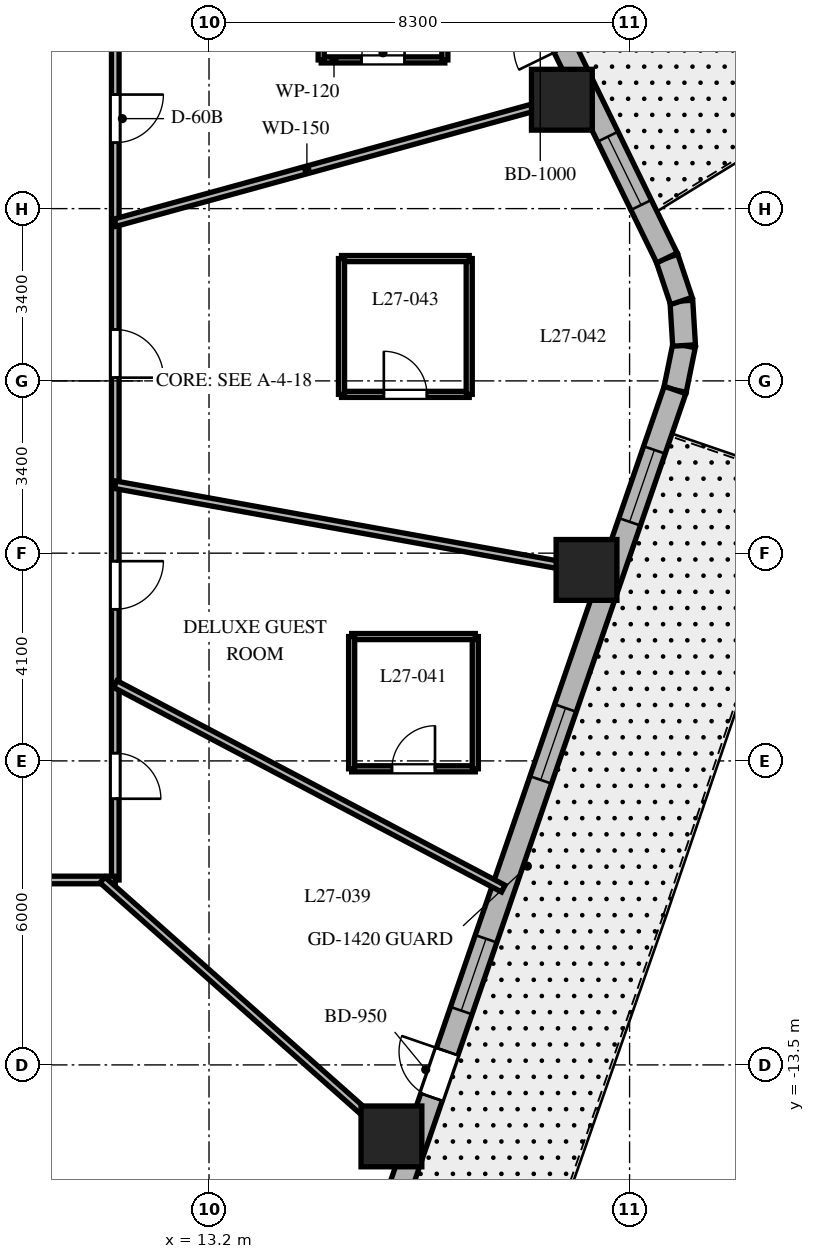
"""IFC4 building model, lengths in metres.
Left out: names, types, materials, properties, quantities, classifications, styles, units other than length and angle.
Written with IfcOpenShell. Run it as: python <this file> out.ifc"""

import sys

from ifc_helpers import new_model, si_unit, direction, frame, frame_2d, origin, origin_2d, place, context, subcontext, project, spatial, rectangle, extrude, element, fill, save


model = new_model("IFC4")
c1 = context("Model", 3, precision=1e-05, world=origin(), true_north=direction((0.0, 1.0)))
c2 = subcontext(c1, "Body", "Model", "MODEL_VIEW")
j1 = project(units=[si_unit("LENGTHUNIT", "METRE"), si_unit("PLANEANGLEUNIT", "RADIAN")], contexts=[c1])
p1 = place(None, origin())
s1 = spatial("IfcSite", under=j1, at=p1, CompositionType="ELEMENT")
p2 = place(p1, origin())
s2 = spatial("IfcBuilding", under=s1, at=p2, CompositionType="ELEMENT")
p3 = place(p2, frame((0.0, 0.0, 113.6)))
s3 = spatial("IfcBuildingStorey", under=s2, at=p3, CompositionType="ELEMENT", Elevation=113.6)
for number, where, z_axis, x_axis in (
    (1, (16.8, -14.911, 0.0), (0.0, 0.0, 1.0), (1.0, 0.0, 0.0)),
    (2, (20.65, -3.731, 0.0), (0.0, 0.0, 1.0), (1.0, 0.0, 0.0)),
    (3, (20.164, 5.549, 0.0), (0.0, 0.0, 1.0), (1.0, 0.0, 0.0)),
):
    element("IfcColumn", number, at=place(p3, frame(where, z_axis=z_axis, x_axis=x_axis)), inside=s3, PredefinedType="COLUMN", context=c2, shape_type="SweptSolid", body=[
        extrude(rectangle(XDim=1.2, YDim=1.2, at=origin_2d()), origin(), (0.0, 0.0, 1.0), 3.7),
    ])
p4 = place(p3, frame((22.397, -0.179, 0.0), z_axis=(0.0, 0.0, 1.0), x_axis=(0.199313589404, 0.979935759669, 0.0)))
e4 = element("IfcWall", 4, at=p4, inside=s3, PredefinedType="SOLIDWALL", context=c2, shape_type="SweptSolid", body=[
    extrude(rectangle(XDim=0.896, YDim=0.45, at=frame_2d((0.448, 0.0))), origin(), (0.0, 0.0, 1.0), 3.4),
])
p5 = place(p3, frame((22.575, 0.698, 0.0), z_axis=(0.0, 0.0, 1.0), x_axis=(-0.060980441946, 0.998138961117, 0.0)))
e5 = element("IfcWall", 5, at=p5, inside=s3, PredefinedType="SOLIDWALL", context=c2, shape_type="SweptSolid", body=[
    extrude(rectangle(XDim=0.881, YDim=0.45, at=frame_2d((0.44, 0.0))), origin(), (0.0, 0.0, 1.0), 3.4),
])
p6 = place(p3, frame((22.522, 1.577, 0.0), z_axis=(0.0, 0.0, 1.0), x_axis=(-0.317372694837, 0.948300887151, 0.0)))
e6 = element("IfcWall", 6, at=p6, inside=s3, PredefinedType="SOLIDWALL", context=c2, shape_type="SweptSolid", body=[
    extrude(rectangle(XDim=0.896, YDim=0.45, at=frame_2d((0.448, 0.0))), origin(), (0.0, 0.0, 1.0), 3.4),
])
p7 = place(p3, frame((15.992, -18.777, 0.0), z_axis=(0.0, 0.0, 1.0), x_axis=(0.325606988926, 0.945505202927, 0.0)))
e7 = element("IfcWall", 7, at=p7, inside=s3, PredefinedType="SOLIDWALL", context=c2, shape_type="SweptSolid", body=[
    extrude(rectangle(XDim=19.669, YDim=0.45, at=frame_2d((9.835, 0.0))), origin(), (0.0, 0.0, 1.0), 3.4),
])
p8 = place(p7, frame((4.909, 0.0, 0.0)))
e8 = element("IfcOpeningElement", 8, at=p8, cuts=e7, PredefinedType="OPENING", context=c2, shape_type="SweptSolid", body=[
    extrude(rectangle(XDim=0.95, YDim=2.15, at=frame_2d((0.475, 1.075))), frame((0.0, 0.235, 0.0), z_axis=(0.0, -1.0, 0.0), x_axis=(1.0, 0.0, 0.0)), (0.0, 0.0, 1.0), 0.47),
])
p9 = place(p7, frame((1.197, 0.0, 0.8)))
e9 = element("IfcOpeningElement", 9, at=p9, cuts=e7, PredefinedType="OPENING", context=c2, shape_type="SweptSolid", body=[
    extrude(rectangle(XDim=1.5, YDim=1.8, at=frame_2d((0.75, 0.9))), frame((0.0, 0.235, 0.0), z_axis=(0.0, -1.0, 0.0), x_axis=(1.0, 0.0, 0.0)), (0.0, 0.0, 1.0), 0.47),
])
p10 = place(p7, frame((6.714, 0.0, 0.8)))
e10 = element("IfcOpeningElement", 10, at=p10, cuts=e7, PredefinedType="OPENING", context=c2, shape_type="SweptSolid", body=[
    extrude(rectangle(XDim=1.5, YDim=1.8, at=frame_2d((0.75, 0.9))), frame((0.0, 0.235, 0.0), z_axis=(0.0, -1.0, 0.0), x_axis=(1.0, 0.0, 0.0)), (0.0, 0.0, 1.0), 0.47),
])
p11 = place(p7, frame((11.53, 0.0, 0.8)))
e11 = element("IfcOpeningElement", 11, at=p11, cuts=e7, PredefinedType="OPENING", context=c2, shape_type="SweptSolid", body=[
    extrude(rectangle(XDim=1.5, YDim=1.8, at=frame_2d((0.75, 0.9))), frame((0.0, 0.235, 0.0), z_axis=(0.0, -1.0, 0.0), x_axis=(1.0, 0.0, 0.0)), (0.0, 0.0, 1.0), 0.47),
])
p12 = place(p7, frame((16.918, 0.0, 0.8)))
e12 = element("IfcOpeningElement", 12, at=p12, cuts=e7, PredefinedType="OPENING", context=c2, shape_type="SweptSolid", body=[
    extrude(rectangle(XDim=1.5, YDim=1.8, at=frame_2d((0.75, 0.9))), frame((0.0, 0.235, 0.0), z_axis=(0.0, -1.0, 0.0), x_axis=(1.0, 0.0, 0.0)), (0.0, 0.0, 1.0), 0.47),
])
p13 = place(p3, frame((22.238, 2.427, 0.0), z_axis=(0.0, 0.0, 1.0), x_axis=(-0.438374803278, 0.898792262901, 0.0)))
e13 = element("IfcWall", 13, at=p13, inside=s3, PredefinedType="SOLIDWALL", context=c2, shape_type="SweptSolid", body=[
    extrude(rectangle(XDim=18.618, YDim=0.45, at=frame_2d((9.309, 0.0))), origin(), (0.0, 0.0, 1.0), 3.4),
])
p14 = place(p13, frame((4.62, 0.0, 0.0)))
e14 = element("IfcOpeningElement", 14, at=p14, cuts=e13, PredefinedType="OPENING", context=c2, shape_type="SweptSolid", body=[
    extrude(rectangle(XDim=1.0, YDim=2.15, at=frame_2d((0.5, 1.075))), frame((0.0, 0.235, 0.0), z_axis=(0.0, -1.0, 0.0), x_axis=(1.0, 0.0, 0.0)), (0.0, 0.0, 1.0), 0.47),
])
p15 = place(p13, frame((6.262, 0.0, 0.8)))
e15 = element("IfcOpeningElement", 15, at=p15, cuts=e13, PredefinedType="OPENING", context=c2, shape_type="SweptSolid", body=[
    extrude(rectangle(XDim=1.5, YDim=1.8, at=frame_2d((0.75, 0.9))), frame((0.0, 0.235, 0.0), z_axis=(0.0, -1.0, 0.0), x_axis=(1.0, 0.0, 0.0)), (0.0, 0.0, 1.0), 0.47),
])
p16 = place(p13, frame((11.501, 0.0, 0.8)))
e16 = element("IfcOpeningElement", 16, at=p16, cuts=e13, PredefinedType="OPENING", context=c2, shape_type="SweptSolid", body=[
    extrude(rectangle(XDim=1.5, YDim=1.8, at=frame_2d((0.75, 0.9))), frame((0.0, 0.235, 0.0), z_axis=(0.0, -1.0, 0.0), x_axis=(1.0, 0.0, 0.0)), (0.0, 0.0, 1.0), 0.47),
])
p17 = place(p13, frame((16.006, 0.0, 0.8)))
e17 = element("IfcOpeningElement", 17, at=p17, cuts=e13, PredefinedType="OPENING", context=c2, shape_type="SweptSolid", body=[
    extrude(rectangle(XDim=1.5, YDim=1.8, at=frame_2d((0.75, 0.9))), frame((0.0, 0.235, 0.0), z_axis=(0.0, -1.0, 0.0), x_axis=(1.0, 0.0, 0.0)), (0.0, 0.0, 1.0), 0.47),
])
p18 = place(p13, frame((1.163, 0.0, 0.8)))
e18 = element("IfcOpeningElement", 18, at=p18, cuts=e13, PredefinedType="OPENING", context=c2, shape_type="SweptSolid", body=[
    extrude(rectangle(XDim=1.5, YDim=1.8, at=frame_2d((0.75, 0.9))), frame((0.0, 0.235, 0.0), z_axis=(0.0, -1.0, 0.0), x_axis=(1.0, 0.0, 0.0)), (0.0, 0.0, 1.0), 0.47),
])
p19 = place(p3, frame((11.35, 9.85, 0.0), z_axis=(0.0, 0.0, 1.0), x_axis=(0.0, -1.0, 0.0)))
e19 = element("IfcWall", 19, at=p19, inside=s3, PredefinedType="PARTITIONING", context=c2, shape_type="SweptSolid", body=[
    extrude(rectangle(XDim=19.7, YDim=0.15, at=frame_2d((9.85, 0.0))), origin(), (0.0, 0.0, 1.0), 2.84),
])
p20 = place(p19, frame((4.199, 0.0, 0.0)))
e20 = element("IfcOpeningElement", 20, at=p20, cuts=e19, PredefinedType="OPENING", context=c2, shape_type="SweptSolid", body=[
    extrude(rectangle(XDim=0.95, YDim=2.03, at=frame_2d((0.475, 1.015))), frame((0.0, 0.085, 0.0), z_axis=(0.0, -1.0, 0.0), x_axis=(1.0, 0.0, 0.0)), (0.0, 0.0, 1.0), 0.17),
])
p21 = place(p19, frame((1.002, 0.0, 0.0)))
e21 = element("IfcOpeningElement", 21, at=p21, cuts=e19, PredefinedType="OPENING", context=c2, shape_type="SweptSolid", body=[
    extrude(rectangle(XDim=0.9, YDim=2.03, at=frame_2d((0.45, 1.015))), frame((0.0, 0.085, 0.0), z_axis=(0.0, -1.0, 0.0), x_axis=(1.0, 0.0, 0.0)), (0.0, 0.0, 1.0), 0.17),
])
p22 = place(p19, frame((17.197, 0.0, 0.0)))
e22 = element("IfcOpeningElement", 22, at=p22, cuts=e19, PredefinedType="OPENING", context=c2, shape_type="SweptSolid", body=[
    extrude(rectangle(XDim=0.9, YDim=2.03, at=frame_2d((0.45, 1.015))), frame((0.0, 0.085, 0.0), z_axis=(0.0, -1.0, 0.0), x_axis=(1.0, 0.0, 0.0)), (0.0, 0.0, 1.0), 0.17),
])
p23 = place(p19, frame((13.408, 0.0, 0.0)))
e23 = element("IfcOpeningElement", 23, at=p23, cuts=e19, PredefinedType="OPENING", context=c2, shape_type="SweptSolid", body=[
    extrude(rectangle(XDim=0.95, YDim=2.03, at=frame_2d((0.475, 1.015))), frame((0.0, 0.085, 0.0), z_axis=(0.0, -1.0, 0.0), x_axis=(1.0, 0.0, 0.0)), (0.0, 0.0, 1.0), 0.17),
])
p24 = place(p19, frame((8.836, 0.0, 0.0)))
e24 = element("IfcOpeningElement", 24, at=p24, cuts=e19, PredefinedType="OPENING", context=c2, shape_type="SweptSolid", body=[
    extrude(rectangle(XDim=0.95, YDim=2.03, at=frame_2d((0.475, 1.015))), frame((0.0, 0.085, 0.0), z_axis=(0.0, -1.0, 0.0), x_axis=(1.0, 0.0, 0.0)), (0.0, 0.0, 1.0), 0.17),
])
p25 = place(p3, frame((11.35, -9.85, 0.0), z_axis=(0.0, 0.0, 1.0), x_axis=(-1.0, 0.0, 0.0)))
e25 = element("IfcWall", 25, at=p25, inside=s3, PredefinedType="PARTITIONING", context=c2, shape_type="SweptSolid", body=[
    extrude(rectangle(XDim=22.7, YDim=0.15, at=frame_2d((11.35, 0.0))), origin(), (0.0, 0.0, 1.0), 2.84),
])
p26 = place(p25, frame((17.237, 0.0, 0.0)))
e26 = element("IfcOpeningElement", 26, at=p26, cuts=e25, PredefinedType="OPENING", context=c2, shape_type="SweptSolid", body=[
    extrude(rectangle(XDim=0.95, YDim=2.03, at=frame_2d((0.475, 1.015))), frame((0.0, 0.085, 0.0), z_axis=(0.0, -1.0, 0.0), x_axis=(1.0, 0.0, 0.0)), (0.0, 0.0, 1.0), 0.17),
])
p27 = place(p25, frame((12.192, 0.0, 0.0)))
e27 = element("IfcOpeningElement", 27, at=p27, cuts=e25, PredefinedType="OPENING", context=c2, shape_type="SweptSolid", body=[
    extrude(rectangle(XDim=0.95, YDim=2.03, at=frame_2d((0.475, 1.015))), frame((0.0, 0.085, 0.0), z_axis=(0.0, -1.0, 0.0), x_axis=(1.0, 0.0, 0.0)), (0.0, 0.0, 1.0), 0.17),
])
p28 = place(p25, frame((8.757, 0.0, 0.0)))
e28 = element("IfcOpeningElement", 28, at=p28, cuts=e25, PredefinedType="OPENING", context=c2, shape_type="SweptSolid", body=[
    extrude(rectangle(XDim=0.95, YDim=2.03, at=frame_2d((0.475, 1.015))), frame((0.0, 0.085, 0.0), z_axis=(0.0, -1.0, 0.0), x_axis=(1.0, 0.0, 0.0)), (0.0, 0.0, 1.0), 0.17),
])
p29 = place(p25, frame((3.399, 0.0, 0.0)))
e29 = element("IfcOpeningElement", 29, at=p29, cuts=e25, PredefinedType="OPENING", context=c2, shape_type="SweptSolid", body=[
    extrude(rectangle(XDim=0.95, YDim=2.03, at=frame_2d((0.475, 1.015))), frame((0.0, 0.085, 0.0), z_axis=(0.0, -1.0, 0.0), x_axis=(1.0, 0.0, 0.0)), (0.0, 0.0, 1.0), 0.17),
])
p30 = place(p3, frame((11.35, 3.123, 0.0), z_axis=(0.0, 0.0, 1.0), x_axis=(0.964151983214, 0.265350623261, 0.0)))
e30 = element("IfcWall", 30, at=p30, inside=s3, PredefinedType="PARTITIONING", context=c2, shape_type="SweptSolid", body=[
    extrude(rectangle(XDim=9.645, YDim=0.15, at=frame_2d((4.823, 0.0))), origin(), (0.0, 0.0, 1.0), 2.54),
])
p31 = place(p3, frame((11.098, -9.85, 0.0), z_axis=(0.0, 0.0, 1.0), x_axis=(0.747904295103, -0.663806572253, 0.0)))
e31 = element("IfcWall", 31, at=p31, inside=s3, PredefinedType="PARTITIONING", context=c2, shape_type="SweptSolid", body=[
    extrude(rectangle(XDim=8.16, YDim=0.15, at=frame_2d((4.08, 0.0))), origin(), (0.0, 0.0, 1.0), 2.54),
])
p32 = place(p3, frame((11.35, -5.983, 0.0), z_axis=(0.0, 0.0, 1.0), x_axis=(0.884597447182, -0.466355397137, 0.0)))
e32 = element("IfcWall", 32, at=p32, inside=s3, PredefinedType="PARTITIONING", context=c2, shape_type="SweptSolid", body=[
    extrude(rectangle(XDim=8.657, YDim=0.15, at=frame_2d((4.328, 0.0))), origin(), (0.0, 0.0, 1.0), 2.54),
])
p33 = place(p3, frame((11.35, -2.051, 0.0), z_axis=(0.0, 0.0, 1.0), x_axis=(0.984068313063, -0.177790762484, 0.0)))
e33 = element("IfcWall", 33, at=p33, inside=s3, PredefinedType="PARTITIONING", context=c2, shape_type="SweptSolid", body=[
    extrude(rectangle(XDim=9.951, YDim=0.15, at=frame_2d((4.976, 0.0))), origin(), (0.0, 0.0, 1.0), 2.54),
])
p34 = place(p3, frame((15.414, 6.335, 0.0), z_axis=(0.0, 0.0, 1.0), x_axis=(1.0, 0.0, 0.0)))
e34 = element("IfcWall", 34, at=p34, inside=s3, PredefinedType="PARTITIONING", context=c2, shape_type="SweptSolid", body=[
    extrude(rectangle(XDim=2.44, YDim=0.12, at=frame_2d((1.22, 0.0))), origin(), (0.0, 0.0, 1.0), 2.84),
])
p35 = place(p34, frame((0.795, 0.0, 0.0)))
e35 = element("IfcOpeningElement", 35, at=p35, cuts=e34, PredefinedType="OPENING", context=c2, shape_type="SweptSolid", body=[
    extrude(rectangle(XDim=0.85, YDim=2.03, at=frame_2d((0.425, 1.015))), frame((0.0, 0.07, 0.0), z_axis=(0.0, -1.0, 0.0), x_axis=(1.0, 0.0, 0.0)), (0.0, 0.0, 1.0), 0.14),
])
p36 = place(p3, frame((17.854, 6.335, 0.0), z_axis=(0.0, 0.0, 1.0), x_axis=(0.0, 1.0, 0.0)))
e36 = element("IfcWall", 36, at=p36, inside=s3, PredefinedType="PARTITIONING", context=c2, shape_type="SweptSolid", body=[
    extrude(rectangle(XDim=2.61, YDim=0.12, at=frame_2d((1.305, 0.0))), origin(), (0.0, 0.0, 1.0), 3.4),
])
p37 = place(p3, frame((15.414, 8.945, 0.0), z_axis=(0.0, 0.0, 1.0), x_axis=(0.0, -1.0, 0.0)))
e37 = element("IfcWall", 37, at=p37, inside=s3, PredefinedType="PARTITIONING", context=c2, shape_type="SweptSolid", body=[
    extrude(rectangle(XDim=2.61, YDim=0.12, at=frame_2d((1.305, 0.0))), origin(), (0.0, 0.0, 1.0), 2.84),
])
p38 = place(p3, frame((16.015, -7.656, 0.0), z_axis=(0.0, 0.0, 1.0), x_axis=(1.0, 0.0, 0.0)))
e38 = element("IfcWall", 38, at=p38, inside=s3, PredefinedType="PARTITIONING", context=c2, shape_type="SweptSolid", body=[
    extrude(rectangle(XDim=2.44, YDim=0.12, at=frame_2d((1.22, 0.0))), origin(), (0.0, 0.0, 1.0), 3.4),
])
p39 = place(p38, frame((0.795, 0.0, 0.0)))
e39 = element("IfcOpeningElement", 39, at=p39, cuts=e38, PredefinedType="OPENING", context=c2, shape_type="SweptSolid", body=[
    extrude(rectangle(XDim=0.85, YDim=2.03, at=frame_2d((0.425, 1.015))), frame((0.0, 0.07, 0.0), z_axis=(0.0, -1.0, 0.0), x_axis=(1.0, 0.0, 0.0)), (0.0, 0.0, 1.0), 0.14),
])
p40 = place(p3, frame((18.455, -7.656, 0.0), z_axis=(0.0, 0.0, 1.0), x_axis=(0.0, 1.0, 0.0)))
e40 = element("IfcWall", 40, at=p40, inside=s3, PredefinedType="PARTITIONING", context=c2, shape_type="SweptSolid", body=[
    extrude(rectangle(XDim=2.61, YDim=0.12, at=frame_2d((1.305, 0.0))), origin(), (0.0, 0.0, 1.0), 3.4),
])
p41 = place(p3, frame((18.455, -5.046, 0.0), z_axis=(0.0, 0.0, 1.0), x_axis=(-1.0, 0.0, 0.0)))
e41 = element("IfcWall", 41, at=p41, inside=s3, PredefinedType="PARTITIONING", context=c2, shape_type="SweptSolid", body=[
    extrude(rectangle(XDim=2.44, YDim=0.12, at=frame_2d((1.22, 0.0))), origin(), (0.0, 0.0, 1.0), 2.84),
])
p42 = place(p3, frame((16.015, -5.046, 0.0), z_axis=(0.0, 0.0, 1.0), x_axis=(0.0, -1.0, 0.0)))
e42 = element("IfcWall", 42, at=p42, inside=s3, PredefinedType="PARTITIONING", context=c2, shape_type="SweptSolid", body=[
    extrude(rectangle(XDim=2.61, YDim=0.12, at=frame_2d((1.305, 0.0))), origin(), (0.0, 0.0, 1.0), 2.84),
])
p43 = place(p3, frame((15.815, -0.266, 0.0), z_axis=(0.0, 0.0, 1.0), x_axis=(1.0, 0.0, 0.0)))
e43 = element("IfcWall", 43, at=p43, inside=s3, PredefinedType="PARTITIONING", context=c2, shape_type="SweptSolid", body=[
    extrude(rectangle(XDim=2.52, YDim=0.12, at=frame_2d((1.26, 0.0))), origin(), (0.0, 0.0, 1.0), 2.84),
])
p44 = place(p43, frame((0.835, 0.0, 0.0)))
e44 = element("IfcOpeningElement", 44, at=p44, cuts=e43, PredefinedType="OPENING", context=c2, shape_type="SweptSolid", body=[
    extrude(rectangle(XDim=0.85, YDim=2.03, at=frame_2d((0.425, 1.015))), frame((0.0, 0.07, 0.0), z_axis=(0.0, -1.0, 0.0), x_axis=(1.0, 0.0, 0.0)), (0.0, 0.0, 1.0), 0.14),
])
p45 = place(p3, frame((18.335, -0.266, 0.0), z_axis=(0.0, 0.0, 1.0), x_axis=(0.0, 1.0, 0.0)))
e45 = element("IfcWall", 45, at=p45, inside=s3, PredefinedType="PARTITIONING", context=c2, shape_type="SweptSolid", body=[
    extrude(rectangle(XDim=2.68, YDim=0.12, at=frame_2d((1.34, 0.0))), origin(), (0.0, 0.0, 1.0), 3.4),
])
p46 = place(p3, frame((18.335, 2.414, 0.0), z_axis=(0.0, 0.0, 1.0), x_axis=(-1.0, 0.0, 0.0)))
e46 = element("IfcWall", 46, at=p46, inside=s3, PredefinedType="PARTITIONING", context=c2, shape_type="SweptSolid", body=[
    extrude(rectangle(XDim=2.52, YDim=0.12, at=frame_2d((1.26, 0.0))), origin(), (0.0, 0.0, 1.0), 2.84),
])
p47 = place(p3, frame((15.815, 2.414, 0.0), z_axis=(0.0, 0.0, 1.0), x_axis=(0.0, -1.0, 0.0)))
e47 = element("IfcWall", 47, at=p47, inside=s3, PredefinedType="PARTITIONING", context=c2, shape_type="SweptSolid", body=[
    extrude(rectangle(XDim=2.68, YDim=0.12, at=frame_2d((1.34, 0.0))), origin(), (0.0, 0.0, 1.0), 3.4),
])
p48 = place(p8, origin())
e48 = element("IfcDoor", 48, at=p48, inside=s3, OperationType="SINGLE_SWING_RIGHT", PredefinedType="DOOR", context=c2, shape_type="SweptSolid", body=[
    extrude(rectangle(XDim=0.95, YDim=2.15, at=frame_2d((0.475, 1.075))), frame((0.0, 0.025, 0.0), z_axis=(0.0, -1.0, 0.0), x_axis=(1.0, 0.0, 0.0)), (0.0, 0.0, 1.0), 0.05),
])
fill(e8, e48)
p49 = place(p10, origin())
e49 = element("IfcWindow", 49, at=p49, inside=s3, PartitioningType="SINGLE_PANEL", PredefinedType="WINDOW", context=c2, shape_type="SweptSolid", body=[
    extrude(rectangle(XDim=1.5, YDim=1.8, at=frame_2d((0.75, 0.9))), frame((0.0, 0.03, 0.0), z_axis=(0.0, -1.0, 0.0), x_axis=(1.0, 0.0, 0.0)), (0.0, 0.0, 1.0), 0.06),
])
fill(e10, e49)
p50 = place(p11, origin())
e50 = element("IfcWindow", 50, at=p50, inside=s3, PartitioningType="SINGLE_PANEL", PredefinedType="WINDOW", context=c2, shape_type="SweptSolid", body=[
    extrude(rectangle(XDim=1.5, YDim=1.8, at=frame_2d((0.75, 0.9))), frame((0.0, 0.03, 0.0), z_axis=(0.0, -1.0, 0.0), x_axis=(1.0, 0.0, 0.0)), (0.0, 0.0, 1.0), 0.06),
])
fill(e11, e50)
p51 = place(p12, origin())
e51 = element("IfcWindow", 51, at=p51, inside=s3, PartitioningType="SINGLE_PANEL", PredefinedType="WINDOW", context=c2, shape_type="SweptSolid", body=[
    extrude(rectangle(XDim=1.5, YDim=1.8, at=frame_2d((0.75, 0.9))), frame((0.0, 0.03, 0.0), z_axis=(0.0, -1.0, 0.0), x_axis=(1.0, 0.0, 0.0)), (0.0, 0.0, 1.0), 0.06),
])
fill(e12, e51)
p52 = place(p18, origin())
e52 = element("IfcWindow", 52, at=p52, inside=s3, PartitioningType="SINGLE_PANEL", PredefinedType="WINDOW", context=c2, shape_type="SweptSolid", body=[
    extrude(rectangle(XDim=1.5, YDim=1.8, at=frame_2d((0.75, 0.9))), frame((0.0, 0.03, 0.0), z_axis=(0.0, -1.0, 0.0), x_axis=(1.0, 0.0, 0.0)), (0.0, 0.0, 1.0), 0.06),
])
fill(e18, e52)
p53 = place(p20, origin())
e53 = element("IfcDoor", 53, at=p53, inside=s3, OperationType="SINGLE_SWING_LEFT", PredefinedType="DOOR", context=c2, shape_type="SweptSolid", body=[
    extrude(rectangle(XDim=0.95, YDim=2.03, at=frame_2d((0.475, 1.015))), frame((0.0, 0.025, 0.0), z_axis=(0.0, -1.0, 0.0), x_axis=(1.0, 0.0, 0.0)), (0.0, 0.0, 1.0), 0.05),
])
fill(e20, e53)
p54 = place(p35, origin())
e54 = element("IfcDoor", 54, at=p54, inside=s3, OperationType="SINGLE_SWING_RIGHT", PredefinedType="DOOR", context=c2, shape_type="SweptSolid", body=[
    extrude(rectangle(XDim=0.85, YDim=2.03, at=frame_2d((0.425, 1.015))), frame((0.0, 0.025, 0.0), z_axis=(0.0, -1.0, 0.0), x_axis=(1.0, 0.0, 0.0)), (0.0, 0.0, 1.0), 0.05),
])
fill(e35, e54)
p55 = place(p22, origin())
e55 = element("IfcDoor", 55, at=p55, inside=s3, OperationType="SINGLE_SWING_RIGHT", PredefinedType="DOOR", context=c2, shape_type="SweptSolid", body=[
    extrude(rectangle(XDim=0.9, YDim=2.03, at=frame_2d((0.45, 1.015))), frame((0.0, 0.025, 0.0), z_axis=(0.0, -1.0, 0.0), x_axis=(1.0, 0.0, 0.0)), (0.0, 0.0, 1.0), 0.05),
])
fill(e22, e55)
p56 = place(p23, origin())
e56 = element("IfcDoor", 56, at=p56, inside=s3, OperationType="SINGLE_SWING_LEFT", PredefinedType="DOOR", context=c2, shape_type="SweptSolid", body=[
    extrude(rectangle(XDim=0.95, YDim=2.03, at=frame_2d((0.475, 1.015))), frame((0.0, 0.025, 0.0), z_axis=(0.0, -1.0, 0.0), x_axis=(1.0, 0.0, 0.0)), (0.0, 0.0, 1.0), 0.05),
])
fill(e23, e56)
p57 = place(p39, origin())
e57 = element("IfcDoor", 57, at=p57, inside=s3, OperationType="SINGLE_SWING_RIGHT", PredefinedType="DOOR", context=c2, shape_type="SweptSolid", body=[
    extrude(rectangle(XDim=0.85, YDim=2.03, at=frame_2d((0.425, 1.015))), frame((0.0, 0.025, 0.0), z_axis=(0.0, -1.0, 0.0), x_axis=(1.0, 0.0, 0.0)), (0.0, 0.0, 1.0), 0.05),
])
fill(e39, e57)
p58 = place(p24, origin())
e58 = element("IfcDoor", 58, at=p58, inside=s3, OperationType="SINGLE_SWING_RIGHT", PredefinedType="DOOR", context=c2, shape_type="SweptSolid", body=[
    extrude(rectangle(XDim=0.95, YDim=2.03, at=frame_2d((0.475, 1.015))), frame((0.0, 0.025, 0.0), z_axis=(0.0, -1.0, 0.0), x_axis=(1.0, 0.0, 0.0)), (0.0, 0.0, 1.0), 0.05),
])
fill(e24, e58)
p59 = place(p44, origin())
e59 = element("IfcDoor", 59, at=p59, inside=s3, OperationType="SINGLE_SWING_LEFT", PredefinedType="DOOR", context=c2, shape_type="SweptSolid", body=[
    extrude(rectangle(XDim=0.85, YDim=2.03, at=frame_2d((0.425, 1.015))), frame((0.0, 0.025, 0.0), z_axis=(0.0, -1.0, 0.0), x_axis=(1.0, 0.0, 0.0)), (0.0, 0.0, 1.0), 0.05),
])
fill(e44, e59)
save(model, sys.argv[1])
